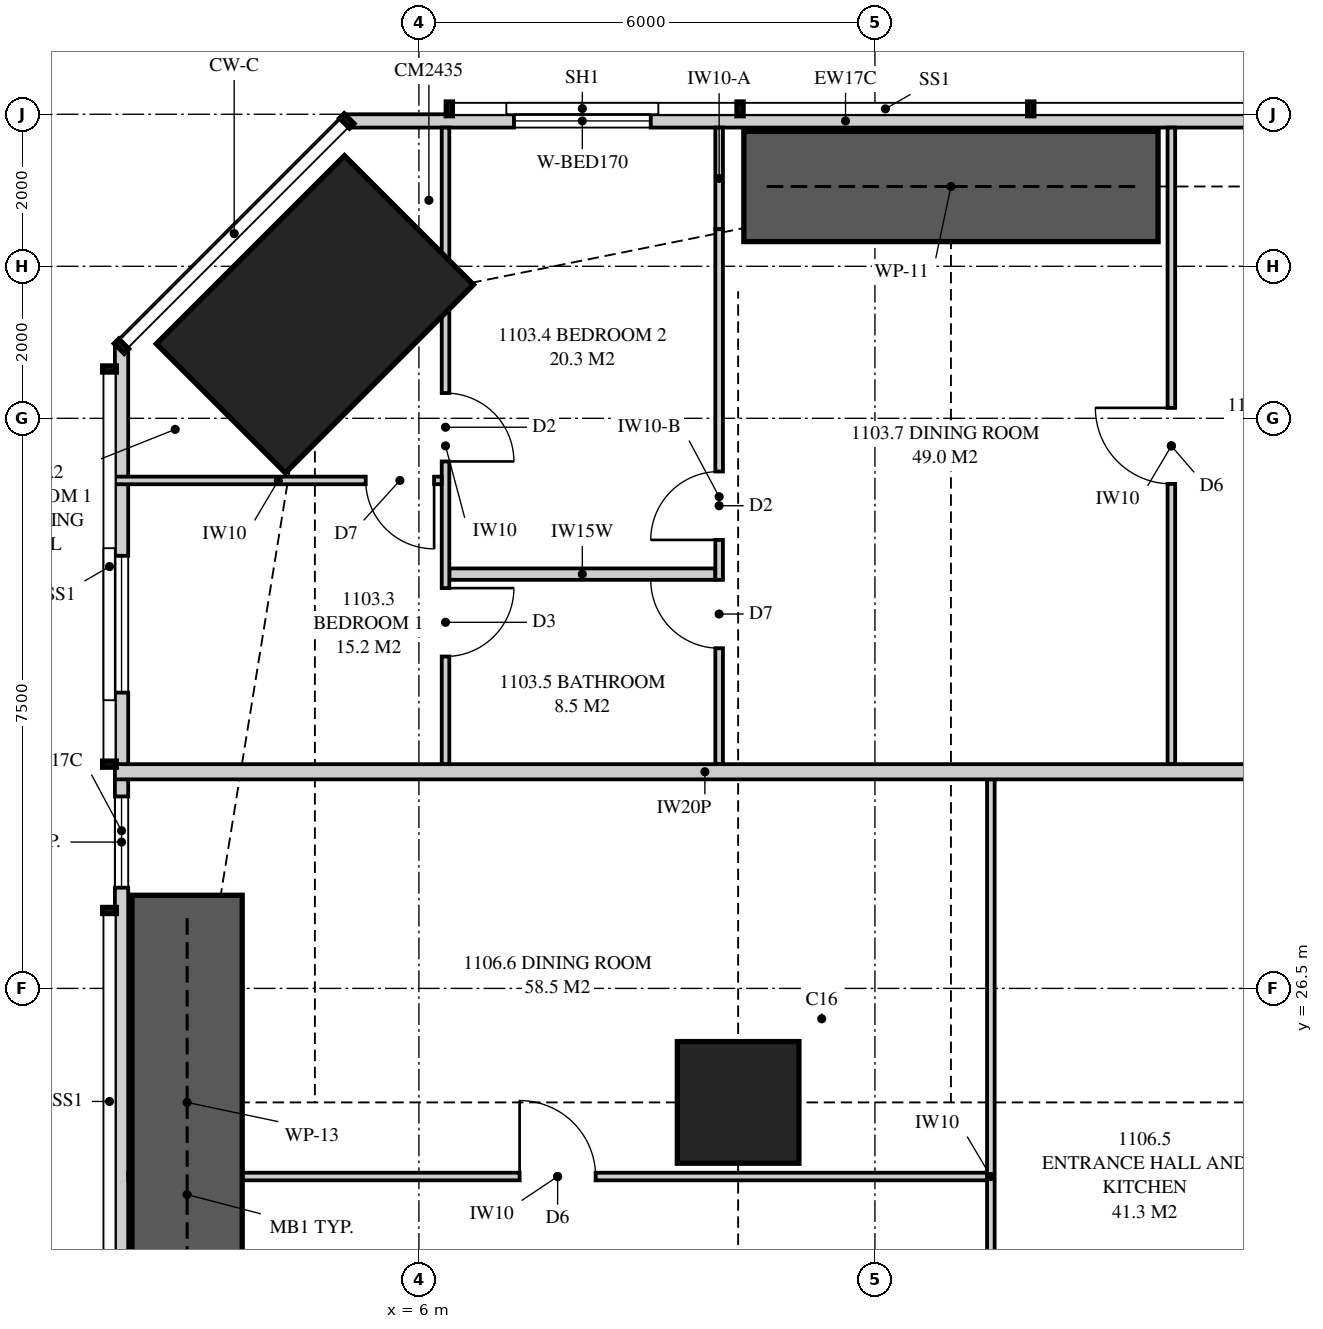
"""IFC4 building model, lengths in metres.
Left out: names, types, materials, properties, quantities, classifications, styles, units other than length and angle.
Written with IfcOpenShell. Run it as: python <this file> out.ifc"""

import sys

from ifc_helpers import new_model, si_unit, direction, frame, frame_2d, origin, origin_2d, place, context, subcontext, project, spatial, polyline, rectangle, outline, extrude, element, fill, save


model = new_model("IFC4")
c1 = context("Model", 3, precision=1e-05, world=origin(), true_north=direction((0.0, 1.0)))
c2 = subcontext(c1, "Body", "Model", "MODEL_VIEW")
j1 = project(units=[si_unit("LENGTHUNIT", "METRE"), si_unit("PLANEANGLEUNIT", "RADIAN")], contexts=[c1])
p1 = place(None, origin())
s1 = spatial("IfcSite", under=j1, at=p1, CompositionType="ELEMENT")
p2 = place(p1, origin())
s2 = spatial("IfcBuilding", under=s1, at=p2, CompositionType="ELEMENT")
p3 = place(p2, frame((0.0, 0.0, 44.45)))
s3 = spatial("IfcBuildingStorey", under=s2, at=p3, CompositionType="ELEMENT", Elevation=44.45)
p4 = place(p3, frame((4.631, 35.369, 0.0), z_axis=(0.0, 0.0, 1.0), x_axis=(0.707106781187, -0.707106781187, 0.0)))
e1 = element("IfcColumn", 1, at=p4, inside=s3, PredefinedType="COLUMN", context=c2, shape_type="SweptSolid", body=[
    extrude(rectangle(XDim=2.4, YDim=3.5, at=origin_2d()), origin(), (0.0, 0.0, 1.0), 3.35),
])
p5 = place(p3, frame((10.2, 25.0, 0.0), z_axis=(0.0, 0.0, 1.0), x_axis=(1.0, 0.0, 0.0)))
e2 = element("IfcColumn", 2, at=p5, inside=s3, PredefinedType="COLUMN", context=c2, shape_type="SweptSolid", body=[
    extrude(rectangle(XDim=1.6, YDim=1.6, at=origin_2d()), origin(), (0.0, 0.0, 1.0), 3.35),
])
p6 = place(p3, frame((18.175, 37.913, 0.0), z_axis=(0.0, 0.0, 1.0), x_axis=(-1.0, 0.0, 0.0)))
e3 = element("IfcWall", 3, at=p6, inside=s3, PredefinedType="SOLIDWALL", context=c2, shape_type="SweptSolid", body=[
    extrude(outline(polyline([(0.0, 0.0), (13.124, 0.0), (13.124, 3.11), (5.379, 3.11), (5.379, 2.15), (5.331, 2.15), (5.331, 3.11), (5.175, 3.11), (5.175, 2.15), (0.0, 2.15), (0.0, 0.0)])), frame((0.0, 0.087, 0.0), z_axis=(0.0, -1.0, 0.0), x_axis=(1.0, 0.0, 0.0)), (0.0, 0.0, 1.0), 0.175),
])
p7 = place(p6, frame((9.125, 0.0, 0.4)))
e4 = element("IfcOpeningElement", 4, at=p7, cuts=e3, PredefinedType="OPENING", context=c2, shape_type="SweptSolid", body=[
    extrude(rectangle(XDim=1.8, YDim=1.7, at=frame_2d((0.9, 0.85))), frame((0.0, 0.097, 0.0), z_axis=(0.0, -1.0, 0.0), x_axis=(1.0, 0.0, 0.0)), (0.0, 0.0, 1.0), 0.195),
])
p8 = place(p3, frame((2.087, 34.949, 0.0), z_axis=(0.0, 0.0, 1.0), x_axis=(0.0, -1.0, 0.0)))
e5 = element("IfcWall", 5, at=p8, inside=s3, PredefinedType="SOLIDWALL", context=c2, shape_type="SweptSolid", body=[
    extrude(outline(polyline([(0.0, 0.0), (12.749, 0.0), (12.749, 2.15), (9.949, 2.15), (9.949, 3.11), (9.823, 3.11), (9.823, 2.15), (9.73, 2.15), (9.73, 3.11), (0.0, 3.11), (0.0, 0.0)])), frame((0.0, 0.087, 0.0), z_axis=(0.0, -1.0, 0.0), x_axis=(1.0, 0.0, 0.0)), (0.0, 0.0, 1.0), 0.175),
])
p9 = place(p8, frame((2.757, 0.0, 0.4)))
e6 = element("IfcOpeningElement", 6, at=p9, cuts=e5, PredefinedType="OPENING", context=c2, shape_type="SweptSolid", body=[
    extrude(rectangle(XDim=1.8, YDim=1.7, at=frame_2d((0.9, 0.85))), frame((0.0, 0.097, 0.0), z_axis=(0.0, -1.0, 0.0), x_axis=(1.0, 0.0, 0.0)), (0.0, 0.0, 1.0), 0.195),
])
p10 = place(p8, frame((5.924, 0.0, 0.4)))
e7 = element("IfcOpeningElement", 7, at=p10, cuts=e5, PredefinedType="OPENING", context=c2, shape_type="SweptSolid", body=[
    extrude(rectangle(XDim=1.2, YDim=1.7, at=frame_2d((0.6, 0.85))), frame((0.0, 0.097, 0.0), z_axis=(0.0, -1.0, 0.0), x_axis=(1.0, 0.0, 0.0)), (0.0, 0.0, 1.0), 0.195),
])
p11 = place(p3, frame((6.35, 37.825, 0.0), z_axis=(0.0, 0.0, 1.0), x_axis=(0.0, -1.0, 0.0)))
e8 = element("IfcWall", 8, at=p11, inside=s3, PredefinedType="PARTITIONING", context=c2, shape_type="SweptSolid", body=[
    extrude(outline(polyline([(0.0, 0.0), (8.375, 0.0), (8.375, 3.11), (2.988, 3.11), (2.988, 2.15), (1.234, 2.15), (1.234, 3.11), (0.0, 3.11), (0.0, 0.0)])), frame((0.0, 0.05, 0.0), z_axis=(0.0, -1.0, 0.0), x_axis=(1.0, 0.0, 0.0)), (0.0, 0.0, 1.0), 0.1),
])
p12 = place(p11, frame((3.492, 0.0, 0.0)))
e9 = element("IfcOpeningElement", 9, at=p12, cuts=e8, PredefinedType="OPENING", context=c2, shape_type="SweptSolid", body=[
    extrude(rectangle(XDim=0.9, YDim=2.1, at=frame_2d((0.45, 1.05))), frame((0.0, 0.06, 0.0), z_axis=(0.0, -1.0, 0.0), x_axis=(1.0, 0.0, 0.0)), (0.0, 0.0, 1.0), 0.12),
])
p13 = place(p11, frame((6.059, 0.0, 0.0)))
e10 = element("IfcOpeningElement", 10, at=p13, cuts=e8, PredefinedType="OPENING", context=c2, shape_type="SweptSolid", body=[
    extrude(rectangle(XDim=0.9, YDim=2.1, at=frame_2d((0.45, 1.05))), frame((0.0, 0.06, 0.0), z_axis=(0.0, -1.0, 0.0), x_axis=(1.0, 0.0, 0.0)), (0.0, 0.0, 1.0), 0.12),
])
p14 = place(p3, frame((9.95, 37.825, 0.0), z_axis=(0.0, 0.0, 1.0), x_axis=(0.0, -1.0, 0.0)))
e11 = element("IfcWall", 11, at=p14, inside=s3, PredefinedType="PARTITIONING", context=c2, shape_type="SweptSolid", body=[
    extrude(outline(polyline([(0.0, 0.0), (1.338, 0.0), (1.338, 2.15), (0.51, 2.15), (0.51, 3.11), (0.0, 3.11), (0.0, 0.0)])), frame((0.0, 0.05, 0.0), z_axis=(0.0, -1.0, 0.0), x_axis=(1.0, 0.0, 0.0)), (0.0, 0.0, 1.0), 0.1),
])
p15 = place(p3, frame((9.95, 36.487, 0.0), z_axis=(0.0, 0.0, 1.0), x_axis=(0.0, -1.0, 0.0)))
e12 = element("IfcWall", 12, at=p15, inside=s3, PredefinedType="PARTITIONING", context=c2, shape_type="SweptSolid", body=[
    extrude(outline(polyline([(0.0, 0.0), (7.037, 0.0), (7.037, 2.51), (0.927, 2.51), (0.927, 2.15), (0.0, 2.15), (0.0, 0.0)])), frame((0.0, 0.05, 0.0), z_axis=(0.0, -1.0, 0.0), x_axis=(1.0, 0.0, 0.0)), (0.0, 0.0, 1.0), 0.1),
])
p16 = place(p15, frame((3.188, 0.0, 0.0)))
e13 = element("IfcOpeningElement", 13, at=p16, cuts=e12, PredefinedType="OPENING", context=c2, shape_type="SweptSolid", body=[
    extrude(rectangle(XDim=0.9, YDim=2.1, at=frame_2d((0.45, 1.05))), frame((0.0, 0.06, 0.0), z_axis=(0.0, -1.0, 0.0), x_axis=(1.0, 0.0, 0.0)), (0.0, 0.0, 1.0), 0.12),
])
p17 = place(p15, frame((4.612, 0.0, 0.0)))
e14 = element("IfcOpeningElement", 14, at=p17, cuts=e12, PredefinedType="OPENING", context=c2, shape_type="SweptSolid", body=[
    extrude(rectangle(XDim=0.9, YDim=2.1, at=frame_2d((0.45, 1.05))), frame((0.0, 0.06, 0.0), z_axis=(0.0, -1.0, 0.0), x_axis=(1.0, 0.0, 0.0)), (0.0, 0.0, 1.0), 0.12),
])
p18 = place(p3, frame((2.0, 33.183, 0.0), z_axis=(0.0, 0.0, 1.0), x_axis=(1.0, 0.0, 0.0)))
e15 = element("IfcWall", 15, at=p18, inside=s3, PredefinedType="PARTITIONING", context=c2, shape_type="SweptSolid", body=[
    extrude(outline(polyline([(0.0, 0.0), (4.3, 0.0), (4.3, 3.11), (3.148, 3.11), (3.148, 2.15), (1.406, 2.15), (1.406, 3.11), (0.0, 3.11), (0.0, 0.0)])), frame((0.0, 0.05, 0.0), z_axis=(0.0, -1.0, 0.0), x_axis=(1.0, 0.0, 0.0)), (0.0, 0.0, 1.0), 0.1),
])
p19 = place(p18, frame((3.3, 0.0, 0.0)))
e16 = element("IfcOpeningElement", 16, at=p19, cuts=e15, PredefinedType="OPENING", context=c2, shape_type="SweptSolid", body=[
    extrude(rectangle(XDim=0.9, YDim=2.1, at=frame_2d((0.45, 1.05))), frame((0.0, 0.06, 0.0), z_axis=(0.0, -1.0, 0.0), x_axis=(1.0, 0.0, 0.0)), (0.0, 0.0, 1.0), 0.12),
])
p20 = place(p3, frame((6.4, 31.95, 0.0), z_axis=(0.0, 0.0, 1.0), x_axis=(1.0, 0.0, 0.0)))
e17 = element("IfcWall", 17, at=p20, inside=s3, PredefinedType="PLUMBINGWALL", context=c2, shape_type="SweptSolid", body=[
    extrude(outline(polyline([(0.0, 0.0), (3.5, 0.0), (3.5, 3.11), (3.5, 2.51), (2.515, 2.51), (2.515, 3.11), (0.0, 3.11), (0.0, 0.0)])), frame((0.0, 0.075, 0.0), z_axis=(0.0, -1.0, 0.0), x_axis=(1.0, 0.0, 0.0)), (0.0, 0.0, 1.0), 0.15),
])
p21 = place(p3, frame((15.9, 37.825, 0.0), z_axis=(0.0, 0.0, 1.0), x_axis=(0.0, -1.0, 0.0)))
e18 = element("IfcWall", 18, at=p21, inside=s3, PredefinedType="PARTITIONING", context=c2, shape_type="SweptSolid", body=[
    extrude(outline(polyline([(0.0, 0.0), (8.375, 0.0), (8.375, 3.11), (1.635, 3.11), (1.635, 2.15), (0.0, 2.15), (0.0, 3.11), (0.0, 0.0)])), frame((0.0, 0.05, 0.0), z_axis=(0.0, -1.0, 0.0), x_axis=(1.0, 0.0, 0.0)), (0.0, 0.0, 1.0), 0.1),
])
p22 = place(p21, frame((3.688, 0.0, 0.0)))
e19 = element("IfcOpeningElement", 19, at=p22, cuts=e18, PredefinedType="OPENING", context=c2, shape_type="SweptSolid", body=[
    extrude(rectangle(XDim=1.0, YDim=2.1, at=frame_2d((0.5, 1.05))), frame((0.0, 0.06, 0.0), z_axis=(0.0, -1.0, 0.0), x_axis=(1.0, 0.0, 0.0)), (0.0, 0.0, 1.0), 0.12),
])
p23 = place(p3, frame((2.0, 29.35, 0.0), z_axis=(0.0, 0.0, 1.0), x_axis=(1.0, 0.0, 0.0)))
e20 = element("IfcWall", 20, at=p23, inside=s3, PredefinedType="PARTITIONING", context=c2, shape_type="SweptSolid", body=[
    extrude(outline(polyline([(0.0, 0.0), (15.525, 0.0), (15.525, 3.11), (11.337, 3.11), (11.337, 2.541), (10.663, 2.541), (10.663, 3.11), (9.51, 3.11), (9.51, 2.51), (6.89, 2.51), (6.89, 3.11), (2.969, 3.11), (2.969, 2.541), (2.577, 2.541), (2.577, 2.15), (0.733, 2.15), (0.733, 3.11), (0.0, 3.11), (0.0, 0.0)])), frame((0.0, 0.1, 0.0), z_axis=(0.0, -1.0, 0.0), x_axis=(1.0, 0.0, 0.0)), (0.0, 0.0, 1.0), 0.2),
])
p24 = place(p3, frame((13.525, 18.8, 0.0), z_axis=(0.0, 0.0, 1.0), x_axis=(0.0, 1.0, 0.0)))
e21 = element("IfcWall", 21, at=p24, inside=s3, PredefinedType="PARTITIONING", context=c2, shape_type="SweptSolid", body=[
    extrude(outline(polyline([(0.0, 0.0), (10.45, 0.0), (10.45, 3.11), (6.487, 3.11), (6.487, 2.541), (5.913, 2.541), (5.913, 3.11), (0.0, 3.11), (0.0, 0.0)])), frame((0.0, 0.05, 0.0), z_axis=(0.0, -1.0, 0.0), x_axis=(1.0, 0.0, 0.0)), (0.0, 0.0, 1.0), 0.1),
])
p25 = place(p24, frame((2.95, 0.0, 0.0)))
e22 = element("IfcOpeningElement", 22, at=p25, cuts=e21, PredefinedType="OPENING", context=c2, shape_type="SweptSolid", body=[
    extrude(rectangle(XDim=1.0, YDim=2.1, at=frame_2d((0.5, 1.05))), frame((0.0, 0.06, 0.0), z_axis=(0.0, -1.0, 0.0), x_axis=(1.0, 0.0, 0.0)), (0.0, 0.0, 1.0), 0.12),
])
p26 = place(p3, frame((2.175, 24.025, 0.0), z_axis=(0.0, 0.0, 1.0), x_axis=(1.0, 0.0, 0.0)))
e23 = element("IfcWall", 23, at=p26, inside=s3, PredefinedType="PARTITIONING", context=c2, shape_type="SweptSolid", body=[
    extrude(outline(polyline([(0.529, 2.15), (0.0, 2.15), (0.0, 0.0), (0.529, 0.0), (0.529, 0.798), (1.021, 0.798), (1.021, 0.0), (11.3, 0.0), (11.3, 3.11), (9.285, 3.11), (9.285, 2.51), (6.765, 2.51), (6.765, 3.11), (1.635, 3.11), (1.635, 2.15), (1.021, 2.15), (1.021, 1.352), (0.529, 1.352), (0.529, 2.15)])), frame((0.0, 0.05, 0.0), z_axis=(0.0, -1.0, 0.0), x_axis=(1.0, 0.0, 0.0)), (0.0, 0.0, 1.0), 0.1),
])
p27 = place(p26, frame((5.15, 0.0, 0.0)))
e24 = element("IfcOpeningElement", 24, at=p27, cuts=e23, PredefinedType="OPENING", context=c2, shape_type="SweptSolid", body=[
    extrude(rectangle(XDim=1.0, YDim=2.1, at=frame_2d((0.5, 1.05))), frame((0.0, 0.06, 0.0), z_axis=(0.0, -1.0, 0.0), x_axis=(1.0, 0.0, 0.0)), (0.0, 0.0, 1.0), 0.12),
])
for number, where, z_axis, x_axis in (
    (25, (10.275, 37.05, 0.0), (0.0, 0.0, 1.0), (1.0, 0.0, 0.0)),
    (26, (2.95, 22.275, 0.0), (0.0, 0.0, 1.0), (0.0, 1.0, 0.0)),
):
    element("IfcWall", number, at=place(p3, frame(where, z_axis=z_axis, x_axis=x_axis)), inside=s3, PredefinedType="SHEAR", context=c2, shape_type="SweptSolid", body=[
        extrude(rectangle(XDim=5.45, YDim=1.45, at=frame_2d((2.725, 0.0))), origin(), (0.0, 0.0, 1.0), 3.35),
    ])
p28 = place(p7, origin())
e27 = element("IfcWindow", 27, at=p28, inside=s3, PartitioningType="SINGLE_PANEL", PredefinedType="WINDOW", context=c2, shape_type="SweptSolid", body=[
    extrude(rectangle(XDim=1.8, YDim=1.7, at=frame_2d((0.9, 0.85))), frame((0.0, 0.03, 0.0), z_axis=(0.0, -1.0, 0.0), x_axis=(1.0, 0.0, 0.0)), (0.0, 0.0, 1.0), 0.06),
])
fill(e4, e27)
p29 = place(p9, origin())
e28 = element("IfcWindow", 28, at=p29, inside=s3, PartitioningType="SINGLE_PANEL", PredefinedType="WINDOW", context=c2, shape_type="SweptSolid", body=[
    extrude(rectangle(XDim=1.8, YDim=1.7, at=frame_2d((0.9, 0.85))), frame((0.0, 0.03, 0.0), z_axis=(0.0, -1.0, 0.0), x_axis=(1.0, 0.0, 0.0)), (0.0, 0.0, 1.0), 0.06),
])
fill(e6, e28)
p30 = place(p10, origin())
e29 = element("IfcWindow", 29, at=p30, inside=s3, PartitioningType="SINGLE_PANEL", PredefinedType="WINDOW", context=c2, shape_type="SweptSolid", body=[
    extrude(rectangle(XDim=1.2, YDim=1.7, at=frame_2d((0.6, 0.85))), frame((0.0, 0.03, 0.0), z_axis=(0.0, -1.0, 0.0), x_axis=(1.0, 0.0, 0.0)), (0.0, 0.0, 1.0), 0.06),
])
fill(e7, e29)
p31 = place(p19, frame((0.9, 0.0, 0.0), z_axis=(0.0, 0.0, 1.0), x_axis=(-1.0, 0.0, 0.0)))
e30 = element("IfcDoor", 30, at=p31, inside=s3, OperationType="SINGLE_SWING_LEFT", PredefinedType="DOOR", context=c2, shape_type="SweptSolid", body=[
    extrude(rectangle(XDim=0.9, YDim=2.1, at=frame_2d((0.45, 1.05))), frame((0.0, 0.025, 0.0), z_axis=(0.0, -1.0, 0.0), x_axis=(1.0, 0.0, 0.0)), (0.0, 0.0, 1.0), 0.05),
])
fill(e16, e30)
p32 = place(p12, origin())
e31 = element("IfcDoor", 31, at=p32, inside=s3, OperationType="SINGLE_SWING_RIGHT", PredefinedType="DOOR", context=c2, shape_type="SweptSolid", body=[
    extrude(rectangle(XDim=0.9, YDim=2.1, at=frame_2d((0.45, 1.05))), frame((0.0, 0.025, 0.0), z_axis=(0.0, -1.0, 0.0), x_axis=(1.0, 0.0, 0.0)), (0.0, 0.0, 1.0), 0.05),
])
fill(e9, e31)
p33 = place(p16, frame((0.9, 0.0, 0.0), z_axis=(0.0, 0.0, 1.0), x_axis=(-1.0, 0.0, 0.0)))
e32 = element("IfcDoor", 32, at=p33, inside=s3, OperationType="SINGLE_SWING_LEFT", PredefinedType="DOOR", context=c2, shape_type="SweptSolid", body=[
    extrude(rectangle(XDim=0.9, YDim=2.1, at=frame_2d((0.45, 1.05))), frame((0.0, 0.025, 0.0), z_axis=(0.0, -1.0, 0.0), x_axis=(1.0, 0.0, 0.0)), (0.0, 0.0, 1.0), 0.05),
])
fill(e13, e32)
p34 = place(p17, frame((0.9, 0.0, 0.0), z_axis=(0.0, 0.0, 1.0), x_axis=(-1.0, 0.0, 0.0)))
e33 = element("IfcDoor", 33, at=p34, inside=s3, OperationType="SINGLE_SWING_RIGHT", PredefinedType="DOOR", context=c2, shape_type="SweptSolid", body=[
    extrude(rectangle(XDim=0.9, YDim=2.1, at=frame_2d((0.45, 1.05))), frame((0.0, 0.025, 0.0), z_axis=(0.0, -1.0, 0.0), x_axis=(1.0, 0.0, 0.0)), (0.0, 0.0, 1.0), 0.05),
])
fill(e14, e33)
p35 = place(p13, origin())
e34 = element("IfcDoor", 34, at=p35, inside=s3, OperationType="SINGLE_SWING_LEFT", PredefinedType="DOOR", context=c2, shape_type="SweptSolid", body=[
    extrude(rectangle(XDim=0.9, YDim=2.1, at=frame_2d((0.45, 1.05))), frame((0.0, 0.025, 0.0), z_axis=(0.0, -1.0, 0.0), x_axis=(1.0, 0.0, 0.0)), (0.0, 0.0, 1.0), 0.05),
])
fill(e10, e34)
p36 = place(p22, frame((1.0, 0.0, 0.0), z_axis=(0.0, 0.0, 1.0), x_axis=(-1.0, 0.0, 0.0)))
e35 = element("IfcDoor", 35, at=p36, inside=s3, OperationType="SINGLE_SWING_RIGHT", PredefinedType="DOOR", context=c2, shape_type="SweptSolid", body=[
    extrude(rectangle(XDim=1.0, YDim=2.1, at=frame_2d((0.5, 1.05))), frame((0.0, 0.025, 0.0), z_axis=(0.0, -1.0, 0.0), x_axis=(1.0, 0.0, 0.0)), (0.0, 0.0, 1.0), 0.05),
])
fill(e19, e35)
p37 = place(p27, origin())
e36 = element("IfcDoor", 36, at=p37, inside=s3, OperationType="SINGLE_SWING_LEFT", PredefinedType="DOOR", context=c2, shape_type="SweptSolid", body=[
    extrude(rectangle(XDim=1.0, YDim=2.1, at=frame_2d((0.5, 1.05))), frame((0.0, 0.025, 0.0), z_axis=(0.0, -1.0, 0.0), x_axis=(1.0, 0.0, 0.0)), (0.0, 0.0, 1.0), 0.05),
])
fill(e24, e36)
save(model, sys.argv[1])
